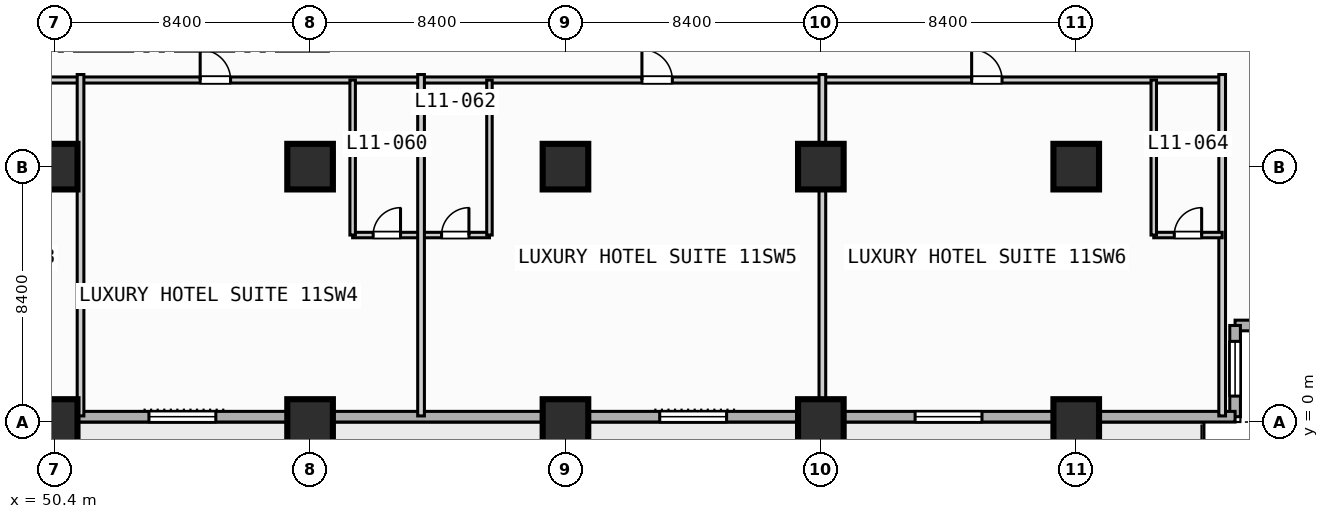
"""IFC4 building model, lengths in metres.
Left out: names, types, materials, properties, quantities, classifications, styles, units other than length and angle.
Written with IfcOpenShell. Run it as: python <this file> out.ifc"""

import sys

from ifc_helpers import new_model, si_unit, direction, frame, frame_2d, origin, origin_2d, place, context, subcontext, project, spatial, rectangle, extrude, element, fill, save


model = new_model("IFC4")
c1 = context("Model", 3, precision=1e-05, world=origin(), true_north=direction((0.0, 1.0)))
c2 = subcontext(c1, "Body", "Model", "MODEL_VIEW")
j1 = project(units=[si_unit("LENGTHUNIT", "METRE"), si_unit("PLANEANGLEUNIT", "RADIAN")], contexts=[c1])
p1 = place(None, origin())
s1 = spatial("IfcSite", under=j1, at=p1, CompositionType="ELEMENT")
p2 = place(p1, origin())
s2 = spatial("IfcBuilding", under=s1, at=p2, CompositionType="ELEMENT")
p3 = place(p2, frame((0.0, 0.0, 51.0)))
s3 = spatial("IfcBuildingStorey", under=s2, at=p3, CompositionType="ELEMENT", Elevation=51.0)
for number, where, z_axis, x_axis in (
    (1, (50.4, 0.0, 0.0), (0.0, 0.0, 1.0), (1.0, 0.0, 0.0)),
    (2, (50.4, 8.4, 0.0), (0.0, 0.0, 1.0), (1.0, 0.0, 0.0)),
    (3, (58.8, 0.0, 0.0), (0.0, 0.0, 1.0), (1.0, 0.0, 0.0)),
    (4, (58.8, 8.4, 0.0), (0.0, 0.0, 1.0), (1.0, 0.0, 0.0)),
    (5, (67.2, 0.0, 0.0), (0.0, 0.0, 1.0), (1.0, 0.0, 0.0)),
    (6, (67.2, 8.4, 0.0), (0.0, 0.0, 1.0), (1.0, 0.0, 0.0)),
    (7, (75.6, 0.0, 0.0), (0.0, 0.0, 1.0), (1.0, 0.0, 0.0)),
    (8, (75.6, 8.4, 0.0), (0.0, 0.0, 1.0), (1.0, 0.0, 0.0)),
    (9, (84.0, 0.0, 0.0), (0.0, 0.0, 1.0), (1.0, 0.0, 0.0)),
    (10, (84.0, 8.4, 0.0), (0.0, 0.0, 1.0), (1.0, 0.0, 0.0)),
):
    element("IfcColumn", number, at=place(p3, frame(where, z_axis=z_axis, x_axis=x_axis)), inside=s3, PredefinedType="COLUMN", context=c2, shape_type="SweptSolid", body=[
        extrude(rectangle(XDim=1.5, YDim=1.5, at=origin_2d()), origin(), (0.0, 0.0, 1.0), 3.8),
    ])
p4 = place(p3, frame((92.225, 3.175, 0.0), z_axis=(0.0, 0.0, 1.0), x_axis=(-1.0, 0.0, 0.0)))
e11 = element("IfcWall", 11, at=p4, inside=s3, PredefinedType="STANDARD", context=c2, shape_type="SweptSolid", body=[
    extrude(rectangle(XDim=3.0, YDim=0.35, at=frame_2d((1.5, 0.0))), origin(), (0.0, 0.0, 1.0), 3.55),
])
p5 = place(p3, frame((89.225, 3.175, 0.0), z_axis=(0.0, 0.0, 1.0), x_axis=(0.0, -1.0, 0.0)))
e12 = element("IfcWall", 12, at=p5, inside=s3, PredefinedType="STANDARD", context=c2, shape_type="SweptSolid", body=[
    extrude(rectangle(XDim=3.0, YDim=0.35, at=frame_2d((1.5, 0.0))), origin(), (0.0, 0.0, 1.0), 3.55),
])
p6 = place(p5, frame((0.522, 0.0, 0.85)))
e13 = element("IfcOpeningElement", 13, at=p6, cuts=e12, PredefinedType="OPENING", context=c2, shape_type="SweptSolid", body=[
    extrude(rectangle(XDim=1.8, YDim=1.8, at=frame_2d((0.9, 0.9))), frame((0.0, 0.185, 0.0), z_axis=(0.0, -1.0, 0.0), x_axis=(1.0, 0.0, 0.0)), (0.0, 0.0, 1.0), 0.37),
])
p7 = place(p3, frame((89.225, 0.175, 0.0), z_axis=(0.0, 0.0, 1.0), x_axis=(-1.0, 0.0, 0.0)))
e14 = element("IfcWall", 14, at=p7, inside=s3, PredefinedType="STANDARD", context=c2, shape_type="SweptSolid", body=[
    extrude(rectangle(XDim=86.05, YDim=0.35, at=frame_2d((43.025, 0.0))), origin(), (0.0, 0.0, 1.0), 3.55),
])
p8 = place(p7, frame((67.525, 0.0, 0.0)))
e15 = element("IfcOpeningElement", 15, at=p8, cuts=e14, PredefinedType="OPENING", context=c2, shape_type="SweptSolid", body=[
    extrude(rectangle(XDim=1.4, YDim=2.2, at=frame_2d((0.7, 1.1))), frame((0.0, 0.185, 0.0), z_axis=(0.0, -1.0, 0.0), x_axis=(1.0, 0.0, 0.0)), (0.0, 0.0, 1.0), 0.37),
])
p9 = place(p7, frame((58.725, 0.0, 0.85)))
e16 = element("IfcOpeningElement", 16, at=p9, cuts=e14, PredefinedType="OPENING", context=c2, shape_type="SweptSolid", body=[
    extrude(rectangle(XDim=2.2, YDim=1.8, at=frame_2d((1.1, 0.9))), frame((0.0, 0.185, 0.0), z_axis=(0.0, -1.0, 0.0), x_axis=(1.0, 0.0, 0.0)), (0.0, 0.0, 1.0), 0.37),
])
p10 = place(p7, frame((41.925, 0.0, 0.85)))
e17 = element("IfcOpeningElement", 17, at=p10, cuts=e14, PredefinedType="OPENING", context=c2, shape_type="SweptSolid", body=[
    extrude(rectangle(XDim=2.2, YDim=1.8, at=frame_2d((1.1, 0.9))), frame((0.0, 0.185, 0.0), z_axis=(0.0, -1.0, 0.0), x_axis=(1.0, 0.0, 0.0)), (0.0, 0.0, 1.0), 0.37),
])
p11 = place(p7, frame((33.525, 0.0, 0.85)))
e18 = element("IfcOpeningElement", 18, at=p11, cuts=e14, PredefinedType="OPENING", context=c2, shape_type="SweptSolid", body=[
    extrude(rectangle(XDim=2.2, YDim=1.8, at=frame_2d((1.1, 0.9))), frame((0.0, 0.185, 0.0), z_axis=(0.0, -1.0, 0.0), x_axis=(1.0, 0.0, 0.0)), (0.0, 0.0, 1.0), 0.37),
])
p12 = place(p7, frame((16.725, 0.0, 0.85)))
e19 = element("IfcOpeningElement", 19, at=p12, cuts=e14, PredefinedType="OPENING", context=c2, shape_type="SweptSolid", body=[
    extrude(rectangle(XDim=2.2, YDim=1.8, at=frame_2d((1.1, 0.9))), frame((0.0, 0.185, 0.0), z_axis=(0.0, -1.0, 0.0), x_axis=(1.0, 0.0, 0.0)), (0.0, 0.0, 1.0), 0.37),
])
p13 = place(p7, frame((8.325, 0.0, 0.85)))
e20 = element("IfcOpeningElement", 20, at=p13, cuts=e14, PredefinedType="OPENING", context=c2, shape_type="SweptSolid", body=[
    extrude(rectangle(XDim=2.2, YDim=1.8, at=frame_2d((1.1, 0.9))), frame((0.0, 0.185, 0.0), z_axis=(0.0, -1.0, 0.0), x_axis=(1.0, 0.0, 0.0)), (0.0, 0.0, 1.0), 0.37),
])
p14 = place(p3, frame((13.65, 11.25, 0.0), z_axis=(0.0, 0.0, 1.0), x_axis=(1.0, 0.0, 0.0)))
e21 = element("IfcWall", 21, at=p14, inside=s3, PredefinedType="PARTITIONING", context=c2, shape_type="SweptSolid", body=[
    extrude(rectangle(XDim=75.15, YDim=0.2, at=frame_2d((37.575, 0.0))), origin(), (0.0, 0.0, 1.0), 3.55),
])
p15 = place(p14, frame((7.265, 0.0, 0.0)))
e22 = element("IfcOpeningElement", 22, at=p15, cuts=e21, PredefinedType="OPENING", context=c2, shape_type="SweptSolid", body=[
    extrude(rectangle(XDim=1.0, YDim=2.15, at=frame_2d((0.5, 1.075))), frame((0.0, 0.11, 0.0), z_axis=(0.0, -1.0, 0.0), x_axis=(1.0, 0.0, 0.0)), (0.0, 0.0, 1.0), 0.22),
])
p16 = place(p14, frame((17.135, 0.0, 0.0)))
e23 = element("IfcOpeningElement", 23, at=p16, cuts=e21, PredefinedType="OPENING", context=c2, shape_type="SweptSolid", body=[
    extrude(rectangle(XDim=1.0, YDim=2.15, at=frame_2d((0.5, 1.075))), frame((0.0, 0.11, 0.0), z_axis=(0.0, -1.0, 0.0), x_axis=(1.0, 0.0, 0.0)), (0.0, 0.0, 1.0), 0.22),
])
p17 = place(p14, frame((31.665, 0.0, 0.0)))
e24 = element("IfcOpeningElement", 24, at=p17, cuts=e21, PredefinedType="OPENING", context=c2, shape_type="SweptSolid", body=[
    extrude(rectangle(XDim=1.0, YDim=2.15, at=frame_2d((0.5, 1.075))), frame((0.0, 0.11, 0.0), z_axis=(0.0, -1.0, 0.0), x_axis=(1.0, 0.0, 0.0)), (0.0, 0.0, 1.0), 0.22),
])
p18 = place(p14, frame((41.535, 0.0, 0.0)))
e25 = element("IfcOpeningElement", 25, at=p18, cuts=e21, PredefinedType="OPENING", context=c2, shape_type="SweptSolid", body=[
    extrude(rectangle(XDim=1.0, YDim=2.15, at=frame_2d((0.5, 1.075))), frame((0.0, 0.11, 0.0), z_axis=(0.0, -1.0, 0.0), x_axis=(1.0, 0.0, 0.0)), (0.0, 0.0, 1.0), 0.22),
])
p19 = place(p14, frame((56.065, 0.0, 0.0)))
e26 = element("IfcOpeningElement", 26, at=p19, cuts=e21, PredefinedType="OPENING", context=c2, shape_type="SweptSolid", body=[
    extrude(rectangle(XDim=1.0, YDim=2.15, at=frame_2d((0.5, 1.075))), frame((0.0, 0.11, 0.0), z_axis=(0.0, -1.0, 0.0), x_axis=(1.0, 0.0, 0.0)), (0.0, 0.0, 1.0), 0.22),
])
p20 = place(p14, frame((66.91, 0.0, 0.0)))
e27 = element("IfcOpeningElement", 27, at=p20, cuts=e21, PredefinedType="OPENING", context=c2, shape_type="SweptSolid", body=[
    extrude(rectangle(XDim=1.0, YDim=2.15, at=frame_2d((0.5, 1.075))), frame((0.0, 0.11, 0.0), z_axis=(0.0, -1.0, 0.0), x_axis=(1.0, 0.0, 0.0)), (0.0, 0.0, 1.0), 0.22),
])
p21 = place(p3, frame((51.25, 0.2, 0.0), z_axis=(0.0, 0.0, 1.0), x_axis=(0.0, 1.0, 0.0)))
e28 = element("IfcWall", 28, at=p21, inside=s3, PredefinedType="PARTITIONING", context=c2, shape_type="SweptSolid", body=[
    extrude(rectangle(XDim=11.23, YDim=0.22, at=frame_2d((5.615, 0.0))), origin(), (0.0, 0.0, 1.0), 3.55),
])
p22 = place(p3, frame((60.2, 6.15, 0.0), z_axis=(0.0, 0.0, 1.0), x_axis=(1.0, 0.0, 0.0)))
e29 = element("IfcWall", 29, at=p22, inside=s3, PredefinedType="PLUMBINGWALL", context=c2, shape_type="SweptSolid", body=[
    extrude(rectangle(XDim=4.5, YDim=0.18, at=frame_2d((2.25, 0.0))), origin(), (0.0, 0.0, 1.0), 3.55),
])
p23 = place(p22, frame((0.675, 0.0, 0.0)))
e30 = element("IfcOpeningElement", 30, at=p23, cuts=e29, PredefinedType="OPENING", context=c2, shape_type="SweptSolid", body=[
    extrude(rectangle(XDim=0.9, YDim=2.1, at=frame_2d((0.45, 1.05))), frame((0.0, 0.1, 0.0), z_axis=(0.0, -1.0, 0.0), x_axis=(1.0, 0.0, 0.0)), (0.0, 0.0, 1.0), 0.2),
])
p24 = place(p22, frame((2.925, 0.0, 0.0)))
e31 = element("IfcOpeningElement", 31, at=p24, cuts=e29, PredefinedType="OPENING", context=c2, shape_type="SweptSolid", body=[
    extrude(rectangle(XDim=0.9, YDim=2.1, at=frame_2d((0.45, 1.05))), frame((0.0, 0.1, 0.0), z_axis=(0.0, -1.0, 0.0), x_axis=(1.0, 0.0, 0.0)), (0.0, 0.0, 1.0), 0.2),
])
p25 = place(p3, frame((60.2, 6.15, 0.0), z_axis=(0.0, 0.0, 1.0), x_axis=(0.0, 1.0, 0.0)))
e32 = element("IfcWall", 32, at=p25, inside=s3, PredefinedType="PLUMBINGWALL", context=c2, shape_type="SweptSolid", body=[
    extrude(rectangle(XDim=5.1, YDim=0.18, at=frame_2d((2.55, 0.0))), origin(), (0.0, 0.0, 1.0), 3.55),
])
p26 = place(p3, frame((62.45, 0.2, 0.0), z_axis=(0.0, 0.0, 1.0), x_axis=(0.0, 1.0, 0.0)))
e33 = element("IfcWall", 33, at=p26, inside=s3, PredefinedType="PARTITIONING", context=c2, shape_type="SweptSolid", body=[
    extrude(rectangle(XDim=11.23, YDim=0.22, at=frame_2d((5.615, 0.0))), origin(), (0.0, 0.0, 1.0), 3.55),
])
p27 = place(p3, frame((64.7, 6.15, 0.0), z_axis=(0.0, 0.0, 1.0), x_axis=(0.0, 1.0, 0.0)))
e34 = element("IfcWall", 34, at=p27, inside=s3, PredefinedType="PLUMBINGWALL", context=c2, shape_type="SweptSolid", body=[
    extrude(rectangle(XDim=5.1, YDim=0.18, at=frame_2d((2.55, 0.0))), origin(), (0.0, 0.0, 1.0), 3.55),
])
p28 = place(p3, frame((75.65, 0.2, 0.0), z_axis=(0.0, 0.0, 1.0), x_axis=(0.0, 1.0, 0.0)))
e35 = element("IfcWall", 35, at=p28, inside=s3, PredefinedType="PARTITIONING", context=c2, shape_type="SweptSolid", body=[
    extrude(rectangle(XDim=11.23, YDim=0.22, at=frame_2d((5.615, 0.0))), origin(), (0.0, 0.0, 1.0), 2.8),
])
p29 = place(p3, frame((88.8, 0.2, 0.0), z_axis=(0.0, 0.0, 1.0), x_axis=(0.0, 1.0, 0.0)))
e36 = element("IfcWall", 36, at=p29, inside=s3, PredefinedType="PARTITIONING", context=c2, shape_type="SweptSolid", body=[
    extrude(rectangle(XDim=11.23, YDim=0.22, at=frame_2d((5.615, 0.0))), origin(), (0.0, 0.0, 1.0), 3.55),
])
p30 = place(p3, frame((86.55, 6.15, 0.0), z_axis=(0.0, 0.0, 1.0), x_axis=(1.0, 0.0, 0.0)))
e37 = element("IfcWall", 37, at=p30, inside=s3, PredefinedType="PLUMBINGWALL", context=c2, shape_type="SweptSolid", body=[
    extrude(rectangle(XDim=2.25, YDim=0.18, at=frame_2d((1.125, 0.0))), origin(), (0.0, 0.0, 1.0), 3.55),
])
p31 = place(p30, frame((0.675, 0.0, 0.0)))
e38 = element("IfcOpeningElement", 38, at=p31, cuts=e37, PredefinedType="OPENING", context=c2, shape_type="SweptSolid", body=[
    extrude(rectangle(XDim=0.9, YDim=2.1, at=frame_2d((0.45, 1.05))), frame((0.0, 0.1, 0.0), z_axis=(0.0, -1.0, 0.0), x_axis=(1.0, 0.0, 0.0)), (0.0, 0.0, 1.0), 0.2),
])
p32 = place(p3, frame((86.55, 6.15, 0.0), z_axis=(0.0, 0.0, 1.0), x_axis=(0.0, 1.0, 0.0)))
e39 = element("IfcWall", 39, at=p32, inside=s3, PredefinedType="PLUMBINGWALL", context=c2, shape_type="SweptSolid", body=[
    extrude(rectangle(XDim=5.1, YDim=0.18, at=frame_2d((2.55, 0.0))), origin(), (0.0, 0.0, 1.0), 3.55),
])
p33 = place(p6, origin())
e40 = element("IfcWindow", 40, at=p33, inside=s3, PartitioningType="SINGLE_PANEL", PredefinedType="WINDOW", context=c2, shape_type="SweptSolid", body=[
    extrude(rectangle(XDim=1.8, YDim=1.8, at=frame_2d((0.9, 0.9))), frame((0.0, 0.03, 0.0), z_axis=(0.0, -1.0, 0.0), x_axis=(1.0, 0.0, 0.0)), (0.0, 0.0, 1.0), 0.06),
])
fill(e13, e40)
p34 = place(p11, origin())
e41 = element("IfcWindow", 41, at=p34, inside=s3, PartitioningType="SINGLE_PANEL", PredefinedType="WINDOW", context=c2, shape_type="SweptSolid", body=[
    extrude(rectangle(XDim=2.2, YDim=1.8, at=frame_2d((1.1, 0.9))), frame((0.0, 0.03, 0.0), z_axis=(0.0, -1.0, 0.0), x_axis=(1.0, 0.0, 0.0)), (0.0, 0.0, 1.0), 0.06),
])
fill(e18, e41)
p35 = place(p12, origin())
e42 = element("IfcWindow", 42, at=p35, inside=s3, PartitioningType="SINGLE_PANEL", PredefinedType="WINDOW", context=c2, shape_type="SweptSolid", body=[
    extrude(rectangle(XDim=2.2, YDim=1.8, at=frame_2d((1.1, 0.9))), frame((0.0, 0.03, 0.0), z_axis=(0.0, -1.0, 0.0), x_axis=(1.0, 0.0, 0.0)), (0.0, 0.0, 1.0), 0.06),
])
fill(e19, e42)
p36 = place(p13, origin())
e43 = element("IfcWindow", 43, at=p36, inside=s3, PartitioningType="SINGLE_PANEL", PredefinedType="WINDOW", context=c2, shape_type="SweptSolid", body=[
    extrude(rectangle(XDim=2.2, YDim=1.8, at=frame_2d((1.1, 0.9))), frame((0.0, 0.03, 0.0), z_axis=(0.0, -1.0, 0.0), x_axis=(1.0, 0.0, 0.0)), (0.0, 0.0, 1.0), 0.06),
])
fill(e20, e43)
p37 = place(p18, origin())
e44 = element("IfcDoor", 44, at=p37, inside=s3, OperationType="SINGLE_SWING_LEFT", PredefinedType="DOOR", context=c2, shape_type="SweptSolid", body=[
    extrude(rectangle(XDim=1.0, YDim=2.15, at=frame_2d((0.5, 1.075))), frame((0.0, 0.025, 0.0), z_axis=(0.0, -1.0, 0.0), x_axis=(1.0, 0.0, 0.0)), (0.0, 0.0, 1.0), 0.05),
])
fill(e25, e44)
p38 = place(p19, origin())
e45 = element("IfcDoor", 45, at=p38, inside=s3, OperationType="SINGLE_SWING_LEFT", PredefinedType="DOOR", context=c2, shape_type="SweptSolid", body=[
    extrude(rectangle(XDim=1.0, YDim=2.15, at=frame_2d((0.5, 1.075))), frame((0.0, 0.025, 0.0), z_axis=(0.0, -1.0, 0.0), x_axis=(1.0, 0.0, 0.0)), (0.0, 0.0, 1.0), 0.05),
])
fill(e26, e45)
p39 = place(p20, origin())
e46 = element("IfcDoor", 46, at=p39, inside=s3, OperationType="SINGLE_SWING_LEFT", PredefinedType="DOOR", context=c2, shape_type="SweptSolid", body=[
    extrude(rectangle(XDim=1.0, YDim=2.15, at=frame_2d((0.5, 1.075))), frame((0.0, 0.025, 0.0), z_axis=(0.0, -1.0, 0.0), x_axis=(1.0, 0.0, 0.0)), (0.0, 0.0, 1.0), 0.05),
])
fill(e27, e46)
p40 = place(p23, origin())
e47 = element("IfcDoor", 47, at=p40, inside=s3, OperationType="SINGLE_SWING_RIGHT", PredefinedType="DOOR", context=c2, shape_type="SweptSolid", body=[
    extrude(rectangle(XDim=0.9, YDim=2.1, at=frame_2d((0.45, 1.05))), frame((0.0, 0.025, 0.0), z_axis=(0.0, -1.0, 0.0), x_axis=(1.0, 0.0, 0.0)), (0.0, 0.0, 1.0), 0.05),
])
fill(e30, e47)
p41 = place(p24, origin())
e48 = element("IfcDoor", 48, at=p41, inside=s3, OperationType="SINGLE_SWING_RIGHT", PredefinedType="DOOR", context=c2, shape_type="SweptSolid", body=[
    extrude(rectangle(XDim=0.9, YDim=2.1, at=frame_2d((0.45, 1.05))), frame((0.0, 0.025, 0.0), z_axis=(0.0, -1.0, 0.0), x_axis=(1.0, 0.0, 0.0)), (0.0, 0.0, 1.0), 0.05),
])
fill(e31, e48)
p42 = place(p31, origin())
e49 = element("IfcDoor", 49, at=p42, inside=s3, OperationType="SINGLE_SWING_RIGHT", PredefinedType="DOOR", context=c2, shape_type="SweptSolid", body=[
    extrude(rectangle(XDim=0.9, YDim=2.1, at=frame_2d((0.45, 1.05))), frame((0.0, 0.025, 0.0), z_axis=(0.0, -1.0, 0.0), x_axis=(1.0, 0.0, 0.0)), (0.0, 0.0, 1.0), 0.05),
])
fill(e38, e49)
save(model, sys.argv[1])
